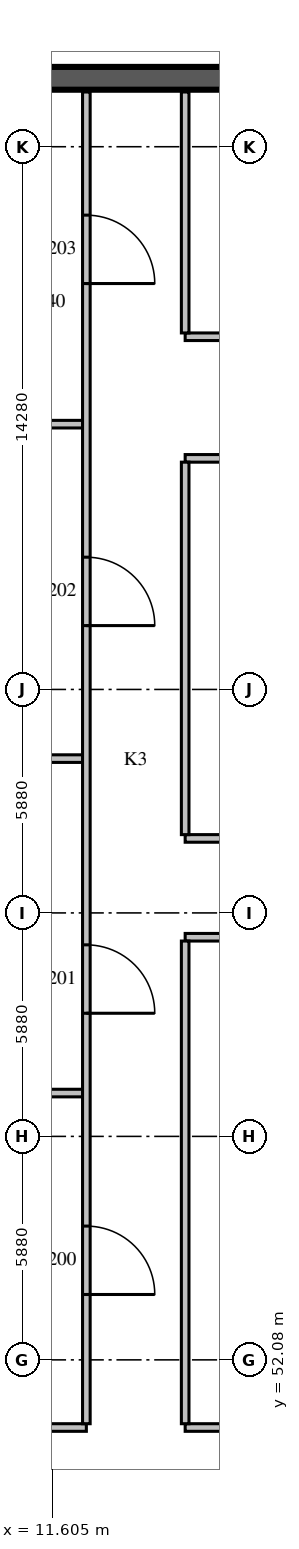
"""IFC4 building model, lengths in metres.
Left out: names, types, materials, properties, quantities, classifications, styles, units other than length and angle.
Written with IfcOpenShell. Run it as: python <this file> out.ifc"""

import sys

from ifc_helpers import new_model, si_unit, direction, frame, frame_2d, origin, place, context, subcontext, project, spatial, rectangle, extrude, source, transform, mapped, element, fill, save


model = new_model("IFC4")
c1 = context("Model", 3, precision=1e-05, world=origin(), true_north=direction((0.0, 1.0)))
c2 = subcontext(c1, "Body", "Model", "MODEL_VIEW")
j1 = project(units=[si_unit("LENGTHUNIT", "METRE"), si_unit("PLANEANGLEUNIT", "RADIAN")], contexts=[c1])
p1 = place(None, origin())
s1 = spatial("IfcSite", under=j1, at=p1, CompositionType="ELEMENT")
p2 = place(p1, origin())
s2 = spatial("IfcBuilding", under=s1, at=p2, CompositionType="ELEMENT")
p3 = place(p2, frame((0.0, 0.0, -4.5)))
s3 = spatial("IfcBuildingStorey", under=s2, at=p3, CompositionType="ELEMENT", Elevation=-4.5)
m1 = source(origin(), c2, "Body", "SweptSolid", [
    extrude(rectangle(XDim=55.68, YDim=0.6, at=frame_2d((27.84, 0.0))), origin(), (0.0, 0.0, 1.0), 4.5),
])
p4 = place(p3, frame((53.58, 85.8, 0.0), z_axis=(0.0, 0.0, 1.0), x_axis=(-1.0, 0.0, 0.0)))
e1 = element("IfcWall", 1, at=p4, inside=s3, PredefinedType="SOLIDWALL", context=c2, shape_type="MappedRepresentation", body=[
    mapped(m1, transform((0.0, 0.0, 0.0), scale=1.0)),
])
m2 = source(origin(), c2, "Body", "SweptSolid", [
    extrude(rectangle(XDim=13.94, YDim=0.2, at=frame_2d((6.97, 0.0))), origin(), (0.0, 0.0, 1.0), 3.9),
])
p5 = place(p3, frame((-1.44, 50.3, 0.0), z_axis=(0.0, 0.0, 1.0), x_axis=(1.0, 0.0, 0.0)))
e2 = element("IfcWall", 2, at=p5, inside=s3, PredefinedType="PARTITIONING", context=c2, shape_type="MappedRepresentation", body=[
    mapped(m2, transform((0.0, 0.0, 0.0), scale=1.0)),
])
m3 = source(origin(), c2, "Body", "SweptSolid", [
    extrude(rectangle(XDim=38.48, YDim=0.2, at=frame_2d((19.24, 0.0))), origin(), (0.0, 0.0, 1.0), 3.9),
])
p6 = place(p3, frame((15.1, 50.3, 0.0), z_axis=(0.0, 0.0, 1.0), x_axis=(1.0, 0.0, 0.0)))
e3 = element("IfcWall", 3, at=p6, inside=s3, PredefinedType="PARTITIONING", context=c2, shape_type="MappedRepresentation", body=[
    mapped(m3, transform((0.0, 0.0, 0.0), scale=1.0)),
])
p7 = place(p3, frame((-1.44, 59.1, 0.0), z_axis=(0.0, 0.0, 1.0), x_axis=(1.0, 0.0, 0.0)))
e4 = element("IfcWall", 4, at=p7, inside=s3, PredefinedType="PARTITIONING", context=c2, shape_type="MappedRepresentation", body=[
    mapped(m2, transform((0.0, 0.0, 0.0), scale=1.0)),
])
m4 = source(origin(), c2, "Body", "SweptSolid", [
    extrude(rectangle(XDim=38.42, YDim=0.2, at=frame_2d((19.21, 0.0))), origin(), (0.0, 0.0, 1.0), 3.9),
])
p8 = place(p3, frame((15.1, 63.2, 0.0), z_axis=(0.0, 0.0, 1.0), x_axis=(1.0, 0.0, 0.0)))
e5 = element("IfcWall", 5, at=p8, inside=s3, PredefinedType="PARTITIONING", context=c2, shape_type="MappedRepresentation", body=[
    mapped(m4, transform((0.0, 0.0, 0.0), scale=1.0)),
])
m5 = source(origin(), c2, "Body", "SweptSolid", [
    extrude(rectangle(XDim=1.0, YDim=2.1, at=frame_2d((0.5, 1.05))), frame((0.0, 0.11, 0.0), z_axis=(0.0, -1.0, 0.0), x_axis=(1.0, 0.0, 0.0)), (0.0, 0.0, 1.0), 0.22),
])
p9 = place(p8, frame((3.3, 0.0, 0.0)))
e6 = element("IfcOpeningElement", 6, at=p9, cuts=e5, PredefinedType="OPENING", context=c2, shape_type="MappedRepresentation", body=[
    mapped(m5, transform((0.0, 0.0, 0.0), scale=1.0)),
])
m6 = source(origin(), c2, "Body", "SweptSolid", [
    extrude(rectangle(XDim=1.8, YDim=2.1, at=frame_2d((0.9, 1.05))), frame((0.0, 0.11, 0.0), z_axis=(0.0, -1.0, 0.0), x_axis=(1.0, 0.0, 0.0)), (0.0, 0.0, 1.0), 0.22),
])
p10 = place(p8, frame((10.6, 0.0, 0.0)))
e7 = element("IfcOpeningElement", 7, at=p10, cuts=e5, PredefinedType="OPENING", context=c2, shape_type="MappedRepresentation", body=[
    mapped(m6, transform((0.0, 0.0, 0.0), scale=1.0)),
])
p11 = place(p8, frame((18.7, 0.0, 0.0)))
e8 = element("IfcOpeningElement", 8, at=p11, cuts=e5, PredefinedType="OPENING", context=c2, shape_type="MappedRepresentation", body=[
    mapped(m6, transform((0.0, 0.0, 0.0), scale=1.0)),
])
p12 = place(p8, frame((26.8, 0.0, 0.0)))
e9 = element("IfcOpeningElement", 9, at=p12, cuts=e5, PredefinedType="OPENING", context=c2, shape_type="MappedRepresentation", body=[
    mapped(m6, transform((0.0, 0.0, 0.0), scale=1.0)),
])
p13 = place(p8, frame((34.5, 0.0, 0.0)))
e10 = element("IfcOpeningElement", 10, at=p13, cuts=e5, PredefinedType="OPENING", context=c2, shape_type="MappedRepresentation", body=[
    mapped(m5, transform((0.0, 0.0, 0.0), scale=1.0)),
])
p14 = place(p3, frame((15.1, 65.8, 0.0), z_axis=(0.0, 0.0, 1.0), x_axis=(1.0, 0.0, 0.0)))
e11 = element("IfcWall", 11, at=p14, inside=s3, PredefinedType="PARTITIONING", context=c2, shape_type="MappedRepresentation", body=[
    mapped(m4, transform((0.0, 0.0, 0.0), scale=1.0)),
])
p15 = place(p14, frame((3.3, 0.0, 0.0)))
e12 = element("IfcOpeningElement", 12, at=p15, cuts=e11, PredefinedType="OPENING", context=c2, shape_type="MappedRepresentation", body=[
    mapped(m5, transform((0.0, 0.0, 0.0), scale=1.0)),
])
p16 = place(p14, frame((11.0, 0.0, 0.0)))
e13 = element("IfcOpeningElement", 13, at=p16, cuts=e11, PredefinedType="OPENING", context=c2, shape_type="MappedRepresentation", body=[
    mapped(m5, transform((0.0, 0.0, 0.0), scale=1.0)),
])
p17 = place(p14, frame((19.1, 0.0, 0.0)))
e14 = element("IfcOpeningElement", 14, at=p17, cuts=e11, PredefinedType="OPENING", context=c2, shape_type="MappedRepresentation", body=[
    mapped(m5, transform((0.0, 0.0, 0.0), scale=1.0)),
])
p18 = place(p14, frame((26.8, 0.0, 0.0)))
e15 = element("IfcOpeningElement", 15, at=p18, cuts=e11, PredefinedType="OPENING", context=c2, shape_type="MappedRepresentation", body=[
    mapped(m5, transform((0.0, 0.0, 0.0), scale=1.0)),
])
p19 = place(p14, frame((34.1, 0.0, 0.0)))
e16 = element("IfcOpeningElement", 16, at=p19, cuts=e11, PredefinedType="OPENING", context=c2, shape_type="MappedRepresentation", body=[
    mapped(m5, transform((0.0, 0.0, 0.0), scale=1.0)),
])
p20 = place(p3, frame((-1.44, 67.9, 0.0), z_axis=(0.0, 0.0, 1.0), x_axis=(1.0, 0.0, 0.0)))
e17 = element("IfcWall", 17, at=p20, inside=s3, PredefinedType="PARTITIONING", context=c2, shape_type="MappedRepresentation", body=[
    mapped(m2, transform((0.0, 0.0, 0.0), scale=1.0)),
])
p21 = place(p3, frame((15.1, 75.8, 0.0), z_axis=(0.0, 0.0, 1.0), x_axis=(1.0, 0.0, 0.0)))
e18 = element("IfcWall", 18, at=p21, inside=s3, PredefinedType="PARTITIONING", context=c2, shape_type="MappedRepresentation", body=[
    mapped(m4, transform((0.0, 0.0, 0.0), scale=1.0)),
])
p22 = place(p3, frame((-1.44, 76.7, 0.0), z_axis=(0.0, 0.0, 1.0), x_axis=(1.0, 0.0, 0.0)))
e19 = element("IfcWall", 19, at=p22, inside=s3, PredefinedType="PARTITIONING", context=c2, shape_type="MappedRepresentation", body=[
    mapped(m2, transform((0.0, 0.0, 0.0), scale=1.0)),
])
p23 = place(p3, frame((15.1, 79.0, 0.0), z_axis=(0.0, 0.0, 1.0), x_axis=(1.0, 0.0, 0.0)))
e20 = element("IfcWall", 20, at=p23, inside=s3, PredefinedType="PARTITIONING", context=c2, shape_type="MappedRepresentation", body=[
    mapped(m4, transform((0.0, 0.0, 0.0), scale=1.0)),
])
p24 = place(p23, frame((3.3, 0.0, 0.0)))
e21 = element("IfcOpeningElement", 21, at=p24, cuts=e20, PredefinedType="OPENING", context=c2, shape_type="MappedRepresentation", body=[
    mapped(m5, transform((0.0, 0.0, 0.0), scale=1.0)),
])
p25 = place(p23, frame((11.4, 0.0, 0.0)))
e22 = element("IfcOpeningElement", 22, at=p25, cuts=e20, PredefinedType="OPENING", context=c2, shape_type="MappedRepresentation", body=[
    mapped(m5, transform((0.0, 0.0, 0.0), scale=1.0)),
])
p26 = place(p23, frame((19.4, 0.0, 0.0)))
e23 = element("IfcOpeningElement", 23, at=p26, cuts=e20, PredefinedType="OPENING", context=c2, shape_type="MappedRepresentation", body=[
    mapped(m5, transform((0.0, 0.0, 0.0), scale=1.0)),
])
p27 = place(p23, frame((26.8, 0.0, 0.0)))
e24 = element("IfcOpeningElement", 24, at=p27, cuts=e20, PredefinedType="OPENING", context=c2, shape_type="MappedRepresentation", body=[
    mapped(m5, transform((0.0, 0.0, 0.0), scale=1.0)),
])
p28 = place(p23, frame((34.1, 0.0, 0.0)))
e25 = element("IfcOpeningElement", 25, at=p28, cuts=e20, PredefinedType="OPENING", context=c2, shape_type="MappedRepresentation", body=[
    mapped(m5, transform((0.0, 0.0, 0.0), scale=1.0)),
])
m7 = source(origin(), c2, "Body", "SweptSolid", [
    extrude(rectangle(XDim=35.04, YDim=0.2, at=frame_2d((17.52, 0.0))), origin(), (0.0, 0.0, 1.0), 3.9),
])
p29 = place(p3, frame((12.5, 50.4, 0.0), z_axis=(0.0, 0.0, 1.0), x_axis=(0.0, 1.0, 0.0)))
e26 = element("IfcWall", 26, at=p29, inside=s3, PredefinedType="PARTITIONING", context=c2, shape_type="MappedRepresentation", body=[
    mapped(m7, transform((0.0, 0.0, 0.0), scale=1.0)),
])
p30 = place(p29, frame((3.4, 0.0, 0.0)))
e27 = element("IfcOpeningElement", 27, at=p30, cuts=e26, PredefinedType="OPENING", context=c2, shape_type="SweptSolid", body=[
    extrude(rectangle(XDim=1.8, YDim=2.1, at=frame_2d((0.9, 1.05))), frame((0.0, 0.11, 0.0), z_axis=(0.0, -1.0, 0.0), x_axis=(1.0, 0.0, 0.0)), (0.0, 0.0, 1.0), 0.22),
])
p31 = place(p29, frame((10.8, 0.0, 0.0)))
e28 = element("IfcOpeningElement", 28, at=p31, cuts=e26, PredefinedType="OPENING", context=c2, shape_type="MappedRepresentation", body=[
    mapped(m6, transform((0.0, 0.0, 0.0), scale=1.0)),
])
p32 = place(p29, frame((21.0, 0.0, 0.0)))
e29 = element("IfcOpeningElement", 29, at=p32, cuts=e26, PredefinedType="OPENING", context=c2, shape_type="MappedRepresentation", body=[
    mapped(m6, transform((0.0, 0.0, 0.0), scale=1.0)),
])
p33 = place(p29, frame((30.0, 0.0, 0.0)))
e30 = element("IfcOpeningElement", 30, at=p33, cuts=e26, PredefinedType="OPENING", context=c2, shape_type="MappedRepresentation", body=[
    mapped(m6, transform((0.0, 0.0, 0.0), scale=1.0)),
])
m8 = source(origin(), c2, "Body", "SweptSolid", [
    extrude(rectangle(XDim=12.7, YDim=0.2, at=frame_2d((6.35, 0.0))), origin(), (0.0, 0.0, 1.0), 3.9),
])
p34 = place(p3, frame((15.1, 50.4, 0.0), z_axis=(0.0, 0.0, 1.0), x_axis=(0.0, 1.0, 0.0)))
e31 = element("IfcWall", 31, at=p34, inside=s3, PredefinedType="PARTITIONING", context=c2, shape_type="MappedRepresentation", body=[
    mapped(m8, transform((0.0, 0.0, 0.0), scale=1.0)),
])
m9 = source(origin(), c2, "Body", "SweptSolid", [
    extrude(rectangle(XDim=9.8, YDim=0.2, at=frame_2d((4.9, 0.0))), origin(), (0.0, 0.0, 1.0), 3.9),
])
p35 = place(p3, frame((15.1, 65.9, 0.0), z_axis=(0.0, 0.0, 1.0), x_axis=(0.0, 1.0, 0.0)))
e32 = element("IfcWall", 32, at=p35, inside=s3, PredefinedType="PARTITIONING", context=c2, shape_type="MappedRepresentation", body=[
    mapped(m9, transform((0.0, 0.0, 0.0), scale=1.0)),
])
m10 = source(origin(), c2, "Body", "SweptSolid", [
    extrude(rectangle(XDim=6.34, YDim=0.2, at=frame_2d((3.17, 0.0))), origin(), (0.0, 0.0, 1.0), 3.9),
])
p36 = place(p3, frame((15.1, 79.1, 0.0), z_axis=(0.0, 0.0, 1.0), x_axis=(0.0, 1.0, 0.0)))
e33 = element("IfcWall", 33, at=p36, inside=s3, PredefinedType="PARTITIONING", context=c2, shape_type="MappedRepresentation", body=[
    mapped(m10, transform((0.0, 0.0, 0.0), scale=1.0)),
])
m11 = source(origin(), c2, "Body", "SweptSolid", [
    extrude(rectangle(XDim=1.8, YDim=2.1, at=frame_2d((0.9, 1.05))), frame((0.0, 0.025, 0.0), z_axis=(0.0, -1.0, 0.0), x_axis=(1.0, 0.0, 0.0)), (0.0, 0.0, 1.0), 0.05),
])
p37 = place(p30, origin())
e34 = element("IfcDoor", 34, at=p37, inside=s3, OperationType="DOUBLE_DOOR_SINGLE_SWING", PredefinedType="DOOR", context=c2, shape_type="MappedRepresentation", body=[
    mapped(m11, transform((0.0, 0.0, 0.0), scale=1.0)),
])
fill(e27, e34)
p38 = place(p31, origin())
e35 = element("IfcDoor", 35, at=p38, inside=s3, OperationType="DOUBLE_DOOR_SINGLE_SWING", PredefinedType="DOOR", context=c2, shape_type="MappedRepresentation", body=[
    mapped(m11, transform((0.0, 0.0, 0.0), scale=1.0)),
])
fill(e28, e35)
p39 = place(p32, origin())
e36 = element("IfcDoor", 36, at=p39, inside=s3, OperationType="DOUBLE_DOOR_SINGLE_SWING", PredefinedType="DOOR", context=c2, shape_type="MappedRepresentation", body=[
    mapped(m11, transform((0.0, 0.0, 0.0), scale=1.0)),
])
fill(e29, e36)
p40 = place(p33, origin())
e37 = element("IfcDoor", 37, at=p40, inside=s3, OperationType="DOUBLE_DOOR_SINGLE_SWING", PredefinedType="DOOR", context=c2, shape_type="MappedRepresentation", body=[
    mapped(m11, transform((0.0, 0.0, 0.0), scale=1.0)),
])
fill(e30, e37)
save(model, sys.argv[1])
